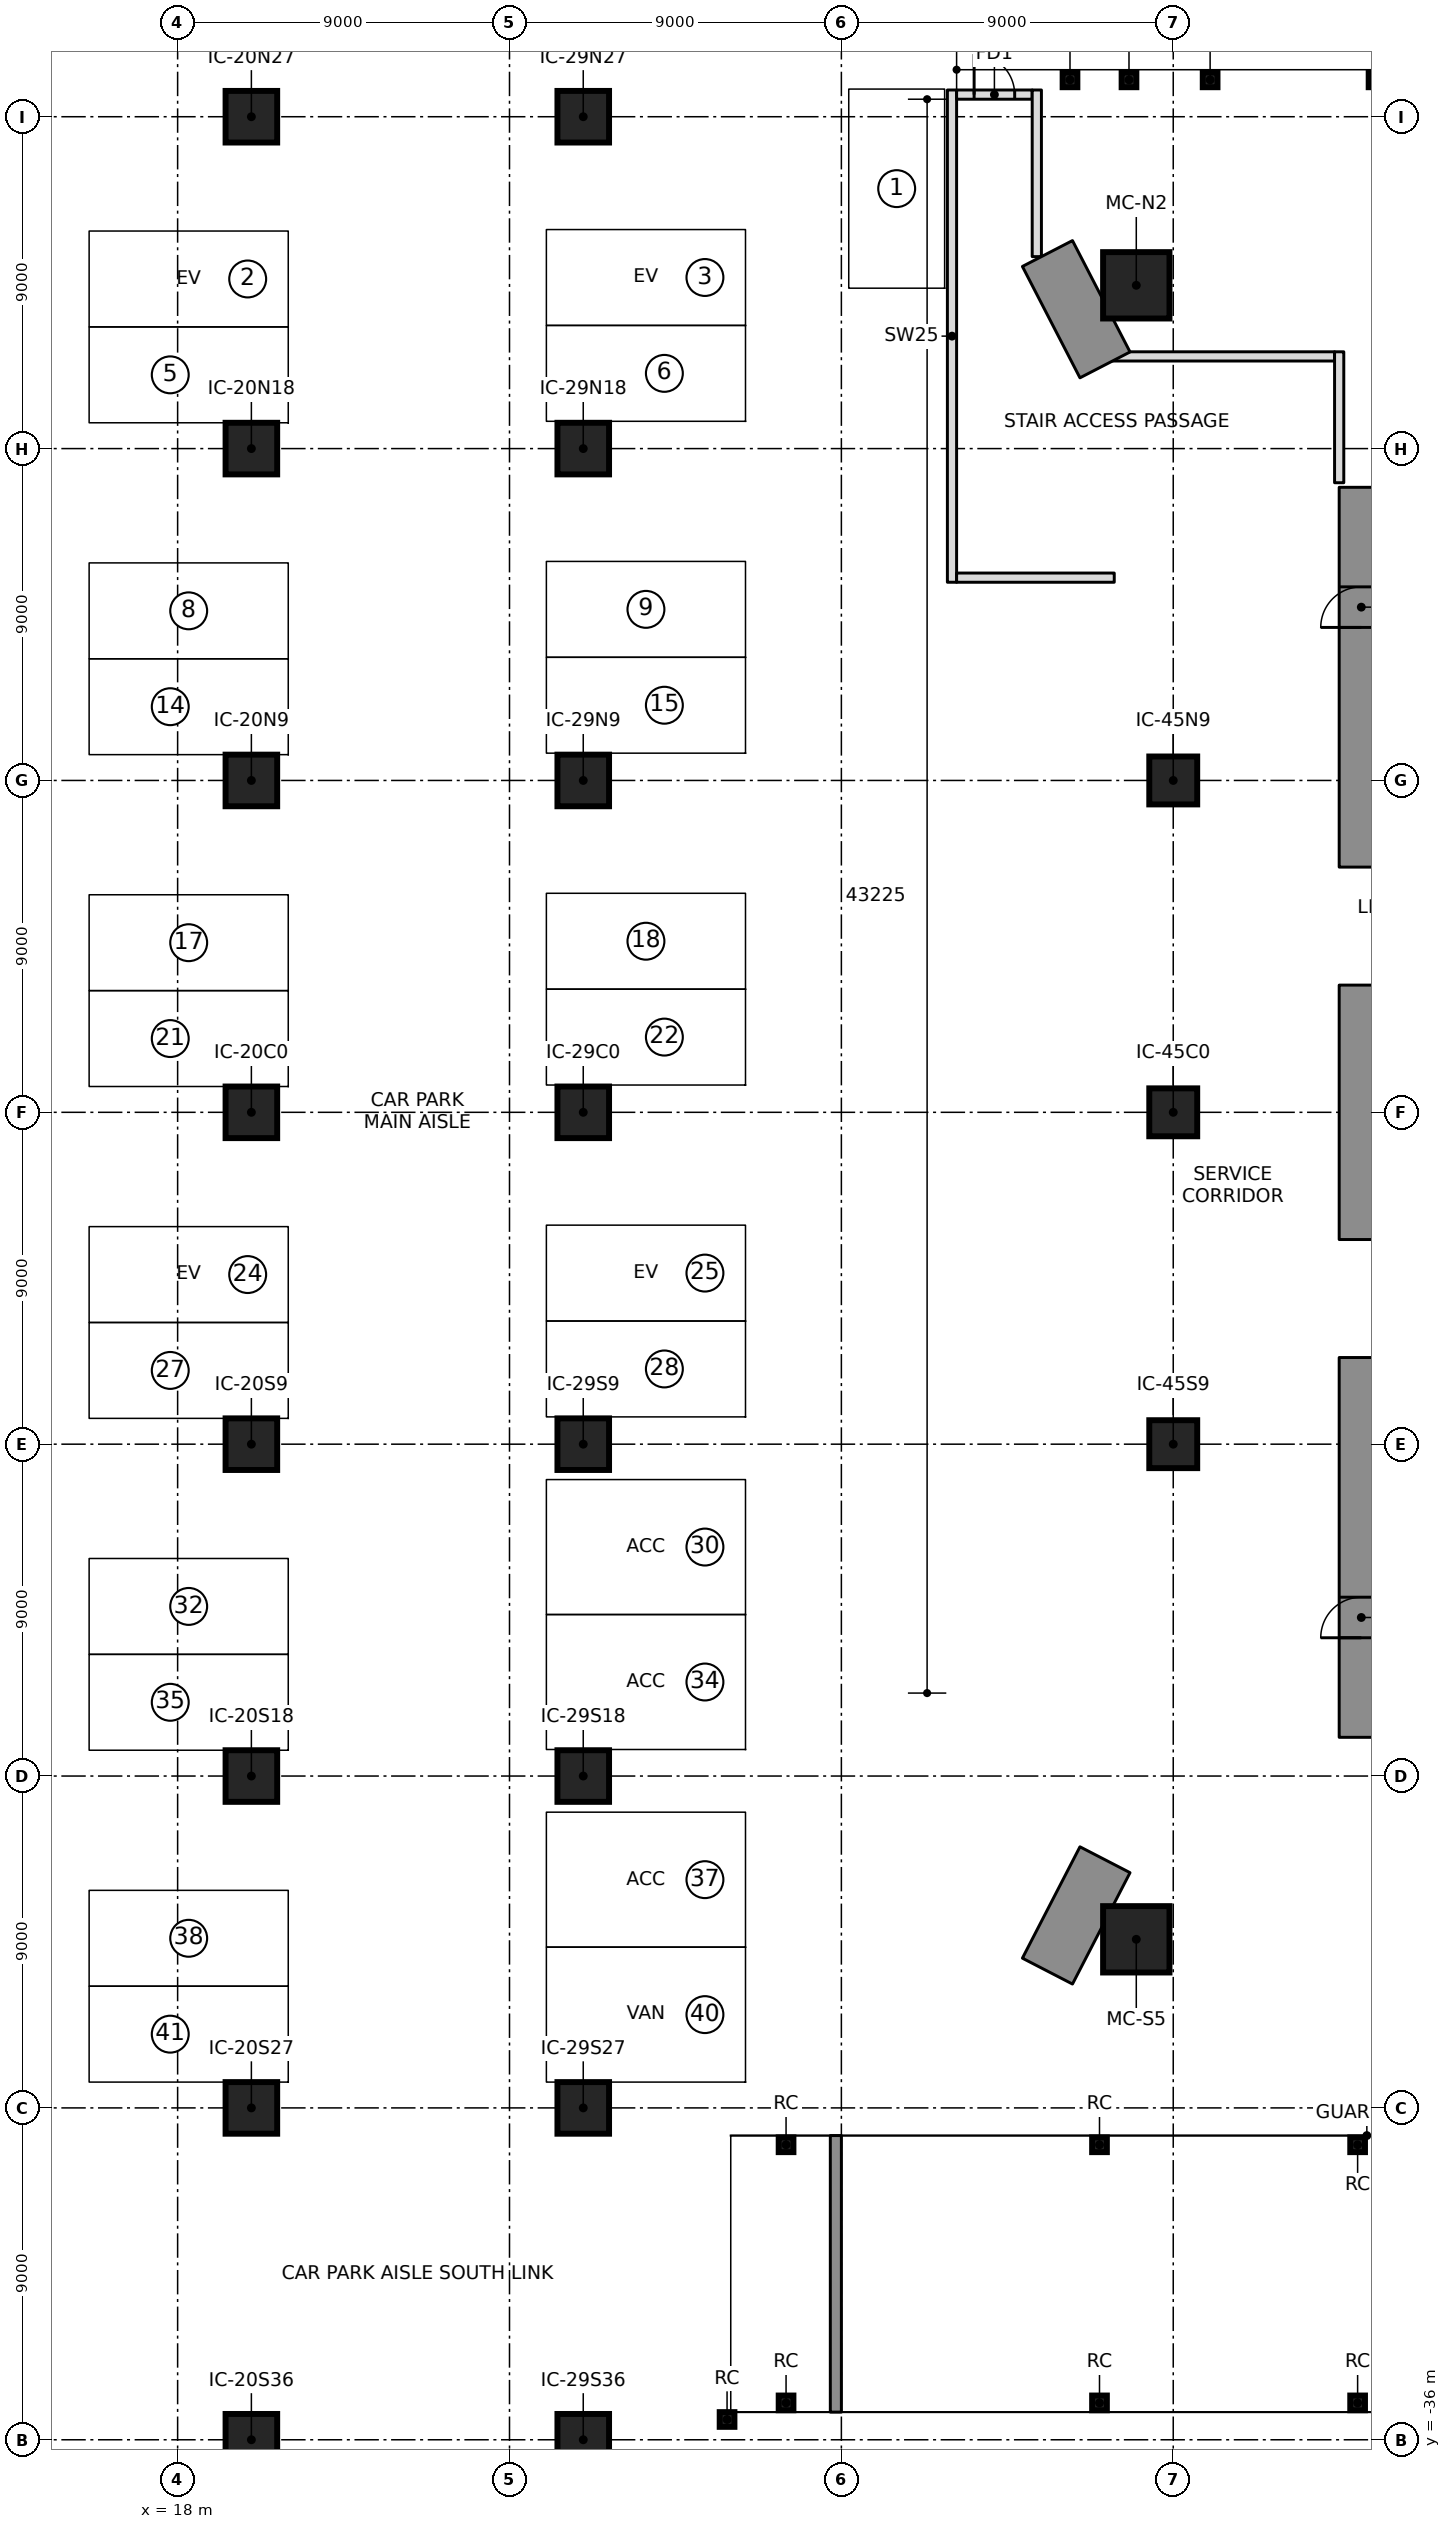
"""IFC4 building model, lengths in metres.
Left out: names, types, materials, properties, quantities, classifications, styles, units other than length and angle.
Written with IfcOpenShell. Run it as: python <this file> out.ifc"""

import sys

from ifc_helpers import new_model, si_unit, direction, frame, frame_2d, origin, origin_2d, place, context, subcontext, project, spatial, polyline, rectangle, outline, extrude, element, fill, save


model = new_model("IFC4")
c1 = context("Model", 3, precision=1e-05, world=origin(), true_north=direction((0.0, 1.0)))
c2 = subcontext(c1, "Body", "Model", "MODEL_VIEW")
j1 = project(units=[si_unit("LENGTHUNIT", "METRE"), si_unit("PLANEANGLEUNIT", "RADIAN")], contexts=[c1])
p1 = place(None, origin())
s1 = spatial("IfcSite", under=j1, at=p1, CompositionType="ELEMENT")
p2 = place(p1, origin())
s2 = spatial("IfcBuilding", under=s1, at=p2, CompositionType="ELEMENT")
p3 = place(p2, frame((0.0, 0.0, -10.0)))
s3 = spatial("IfcBuildingStorey", under=s2, at=p3, CompositionType="ELEMENT", Elevation=-10.0)
p4 = place(p3, frame((50.1, 6.65, -0.3), z_axis=(0.0, 0.0, 1.0), x_axis=(0.0, 1.0, 0.0)))
e1 = element("IfcWall", 1, at=p4, inside=s3, PredefinedType="SHEAR", context=c2, shape_type="SweptSolid", body=[
    extrude(rectangle(XDim=10.3, YDim=1.2, at=frame_2d((5.15, 0.0))), origin(), (0.0, 0.0, 1.0), 5.3),
])
p5 = place(p4, frame((6.5, 0.0, 0.3)))
e2 = element("IfcOpeningElement", 2, at=p5, cuts=e1, PredefinedType="OPENING", context=c2, shape_type="SweptSolid", body=[
    extrude(rectangle(XDim=1.1, YDim=2.1, at=frame_2d((0.55, 1.05))), frame((0.0, 0.61, 0.0), z_axis=(0.0, -1.0, 0.0), x_axis=(1.0, 0.0, 0.0)), (0.0, 0.0, 1.0), 1.22),
])
p6 = place(p3, frame((50.1, -3.45, -0.3), z_axis=(0.0, 0.0, 1.0), x_axis=(0.0, 1.0, 0.0)))
e3 = element("IfcWall", 3, at=p6, inside=s3, PredefinedType="SHEAR", context=c2, shape_type="SweptSolid", body=[
    extrude(rectangle(XDim=6.9, YDim=1.2, at=frame_2d((3.45, 0.0))), origin(), (0.0, 0.0, 1.0), 5.3),
])
p7 = place(p3, frame((50.1, -16.95, -0.3), z_axis=(0.0, 0.0, 1.0), x_axis=(0.0, 1.0, 0.0)))
e4 = element("IfcWall", 4, at=p7, inside=s3, PredefinedType="SHEAR", context=c2, shape_type="SweptSolid", body=[
    extrude(rectangle(XDim=10.3, YDim=1.2, at=frame_2d((5.15, 0.0))), origin(), (0.0, 0.0, 1.0), 5.3),
])
p8 = place(p7, frame((2.7, 0.0, 0.3)))
e5 = element("IfcOpeningElement", 5, at=p8, cuts=e4, PredefinedType="OPENING", context=c2, shape_type="SweptSolid", body=[
    extrude(rectangle(XDim=1.1, YDim=2.1, at=frame_2d((0.55, 1.05))), frame((0.0, 0.61, 0.0), z_axis=(0.0, -1.0, 0.0), x_axis=(1.0, 0.0, 0.0)), (0.0, 0.0, 1.0), 1.22),
])
for number, where, z_axis, x_axis in (
    (6, (43.998, -22.428, -0.3), (0.0, 0.0, 1.0), (1.0, 0.0, 0.0)),
    (7, (43.998, 22.428, -0.3), (0.0, 0.0, 1.0), (1.0, 0.0, 0.0)),
):
    element("IfcColumn", number, at=place(p3, frame(where, z_axis=z_axis, x_axis=x_axis)), inside=s3, PredefinedType="COLUMN", context=c2, shape_type="SweptSolid", body=[
        extrude(rectangle(XDim=1.8, YDim=1.8, at=origin_2d()), origin(), (0.0, 0.0, 1.0), 5.3),
    ])
for number, where, z_axis, x_axis in (
    (8, (20.0, -36.0, -0.3), (0.0, 0.0, 1.0), (1.0, 0.0, 0.0)),
    (9, (20.0, -27.0, -0.3), (0.0, 0.0, 1.0), (1.0, 0.0, 0.0)),
    (10, (20.0, -18.0, -0.3), (0.0, 0.0, 1.0), (1.0, 0.0, 0.0)),
    (11, (20.0, -9.0, -0.3), (0.0, 0.0, 1.0), (1.0, 0.0, 0.0)),
    (12, (20.0, 0.0, -0.3), (0.0, 0.0, 1.0), (1.0, 0.0, 0.0)),
    (13, (20.0, 9.0, -0.3), (0.0, 0.0, 1.0), (1.0, 0.0, 0.0)),
    (14, (20.0, 18.0, -0.3), (0.0, 0.0, 1.0), (1.0, 0.0, 0.0)),
    (15, (20.0, 27.0, -0.3), (0.0, 0.0, 1.0), (1.0, 0.0, 0.0)),
    (16, (29.0, -36.0, -0.3), (0.0, 0.0, 1.0), (1.0, 0.0, 0.0)),
    (17, (29.0, -27.0, -0.3), (0.0, 0.0, 1.0), (1.0, 0.0, 0.0)),
    (18, (29.0, -18.0, -0.3), (0.0, 0.0, 1.0), (1.0, 0.0, 0.0)),
    (19, (29.0, -9.0, -0.3), (0.0, 0.0, 1.0), (1.0, 0.0, 0.0)),
    (20, (29.0, 0.0, -0.3), (0.0, 0.0, 1.0), (1.0, 0.0, 0.0)),
    (21, (29.0, 9.0, -0.3), (0.0, 0.0, 1.0), (1.0, 0.0, 0.0)),
    (22, (29.0, 18.0, -0.3), (0.0, 0.0, 1.0), (1.0, 0.0, 0.0)),
    (23, (29.0, 27.0, -0.3), (0.0, 0.0, 1.0), (1.0, 0.0, 0.0)),
):
    element("IfcColumn", number, at=place(p3, frame(where, z_axis=z_axis, x_axis=x_axis)), inside=s3, PredefinedType="COLUMN", context=c2, shape_type="SweptSolid", body=[
        extrude(rectangle(XDim=1.4, YDim=1.4, at=origin_2d()), origin(), (0.0, 0.0, 1.0), 5.3),
    ])
for number, where, z_axis, x_axis in (
    (24, (45.0, -9.0, -0.3), (0.0, 0.0, 1.0), (1.0, 0.0, 0.0)),
    (25, (45.0, 0.0, -0.3), (0.0, 0.0, 1.0), (1.0, 0.0, 0.0)),
    (26, (45.0, 9.0, -0.3), (0.0, 0.0, 1.0), (1.0, 0.0, 0.0)),
):
    element("IfcColumn", number, at=place(p3, frame(where, z_axis=z_axis, x_axis=x_axis)), inside=s3, PredefinedType="COLUMN", context=c2, shape_type="SweptSolid", body=[
        extrude(rectangle(XDim=1.3, YDim=1.3, at=origin_2d()), origin(), (0.0, 0.0, 1.0), 5.3),
    ])
for number, where, z_axis, x_axis in (
    (27, (41.69, -21.429, -0.3), (0.0, 0.0, 1.0), (0.888, -0.459, 0.0)),
    (28, (41.69, 21.429, -0.3), (0.0, 0.0, 1.0), (0.888, 0.459, 0.0)),
):
    element("IfcWall", number, at=place(p3, frame(where, z_axis=z_axis, x_axis=x_axis)), inside=s3, PredefinedType="SHEAR", context=c2, shape_type="SweptSolid", body=[
        extrude(rectangle(XDim=1.529, YDim=3.4, at=frame_2d((0.764, 0.0))), origin(), (0.0, 0.0, 1.0), 15.3),
    ])
p9 = place(p3, frame((42.2, 28.0, -0.3), z_axis=(0.0, 0.0, 1.0), x_axis=(1.0, 0.0, 0.0)))
e29 = element("IfcColumn", 29, at=p9, inside=s3, PredefinedType="COLUMN", context=c2, shape_type="SweptSolid", body=[
    extrude(rectangle(XDim=0.4, YDim=0.4, at=origin_2d()), origin(), (0.0, 0.0, 1.0), 4.908),
])
p10 = place(p3, frame((43.8, 28.0, -0.3), z_axis=(0.0, 0.0, 1.0), x_axis=(1.0, 0.0, 0.0)))
e30 = element("IfcColumn", 30, at=p10, inside=s3, PredefinedType="COLUMN", context=c2, shape_type="SweptSolid", body=[
    extrude(rectangle(XDim=0.4, YDim=0.4, at=origin_2d()), origin(), (0.0, 0.0, 1.0), 5.042),
])
p11 = place(p3, frame((46.0, 28.0, -0.3), z_axis=(0.0, 0.0, 1.0), x_axis=(1.0, 0.0, 0.0)))
e31 = element("IfcColumn", 31, at=p11, inside=s3, PredefinedType="COLUMN", context=c2, shape_type="SweptSolid", body=[
    extrude(rectangle(XDim=0.4, YDim=0.4, at=origin_2d()), origin(), (0.0, 0.0, 1.0), 5.337),
])
p12 = place(p3, frame((50.5, 28.0, -0.3), z_axis=(0.0, 0.0, 1.0), x_axis=(1.0, 0.0, 0.0)))
e32 = element("IfcColumn", 32, at=p12, inside=s3, PredefinedType="COLUMN", context=c2, shape_type="SweptSolid", body=[
    extrude(rectangle(XDim=0.4, YDim=0.4, at=origin_2d()), origin(), (0.0, 0.0, 1.0), 5.3),
])
for number, where, z_axis, x_axis in (
    (33, (34.5, -35.0, -0.3), (0.0, 0.0, 1.0), (1.0, 0.0, 0.0)),
    (34, (34.5, -28.0, -0.3), (0.0, 0.0, 1.0), (1.0, 0.0, 0.0)),
):
    element("IfcColumn", number, at=place(p3, frame(where, z_axis=z_axis, x_axis=x_axis)), inside=s3, PredefinedType="COLUMN", context=c2, shape_type="SweptSolid", body=[
        extrude(rectangle(XDim=0.4, YDim=0.4, at=origin_2d()), origin(), (0.0, 0.0, 1.0), 4.725),
    ])
for number, where, z_axis, x_axis in (
    (35, (43.0, -35.0, -0.3), (0.0, 0.0, 1.0), (1.0, 0.0, 0.0)),
    (36, (43.0, -28.0, -0.3), (0.0, 0.0, 1.0), (1.0, 0.0, 0.0)),
):
    element("IfcColumn", number, at=place(p3, frame(where, z_axis=z_axis, x_axis=x_axis)), inside=s3, PredefinedType="COLUMN", context=c2, shape_type="SweptSolid", body=[
        extrude(rectangle(XDim=0.4, YDim=0.4, at=origin_2d()), origin(), (0.0, 0.0, 1.0), 3.495),
    ])
for number, where, z_axis, x_axis in (
    (37, (50.0, -35.0, -0.3), (0.0, 0.0, 1.0), (1.0, 0.0, 0.0)),
    (38, (50.0, -28.0, -0.3), (0.0, 0.0, 1.0), (1.0, 0.0, 0.0)),
):
    element("IfcColumn", number, at=place(p3, frame(where, z_axis=z_axis, x_axis=x_axis)), inside=s3, PredefinedType="COLUMN", context=c2, shape_type="SweptSolid", body=[
        extrude(rectangle(XDim=0.4, YDim=0.4, at=origin_2d()), origin(), (0.0, 0.0, 1.0), 2.39),
    ])
p13 = place(p3, frame((32.9, -35.45, -0.3), z_axis=(0.0, 0.0, 1.0), x_axis=(1.0, 0.0, 0.0)))
e39 = element("IfcColumn", 39, at=p13, inside=s3, PredefinedType="COLUMN", context=c2, shape_type="SweptSolid", body=[
    extrude(rectangle(XDim=0.4, YDim=0.4, at=origin_2d()), origin(), (0.0, 0.0, 1.0), 5.0),
])
p14 = place(p3, frame((35.85, -35.25, -0.3), z_axis=(0.0, 0.0, 1.0), x_axis=(0.0, 1.0, 0.0)))
e40 = element("IfcWall", 40, at=p14, inside=s3, PredefinedType="SOLIDWALL", context=c2, shape_type="SweptSolid", body=[
    extrude(rectangle(XDim=7.5, YDim=0.3, at=frame_2d((3.75, 0.0))), origin(), (0.0, 0.0, 1.0), 4.594),
])
p15 = place(p3, frame((39.0, 14.375, 0.0), z_axis=(0.0, 0.0, 1.0), x_axis=(0.0, 1.0, 0.0)))
e41 = element("IfcWall", 41, at=p15, inside=s3, PredefinedType="PARTITIONING", context=c2, shape_type="SweptSolid", body=[
    extrude(rectangle(XDim=13.35, YDim=0.25, at=frame_2d((6.675, 0.0))), origin(), (0.0, 0.0, 1.0), 4.7),
])
p16 = place(p3, frame((39.125, 14.5, 0.0), z_axis=(0.0, 0.0, 1.0), x_axis=(1.0, 0.0, 0.0)))
e42 = element("IfcWall", 42, at=p16, inside=s3, PredefinedType="PARTITIONING", context=c2, shape_type="SweptSolid", body=[
    extrude(rectangle(XDim=4.275, YDim=0.25, at=frame_2d((2.137, 0.0))), origin(), (0.0, 0.0, 1.0), 4.7),
])
p17 = place(p3, frame((39.125, 27.6, 0.0), z_axis=(0.0, 0.0, 1.0), x_axis=(1.0, 0.0, 0.0)))
e43 = element("IfcWall", 43, at=p17, inside=s3, PredefinedType="PARTITIONING", context=c2, shape_type="SweptSolid", body=[
    extrude(rectangle(XDim=2.05, YDim=0.25, at=frame_2d((1.025, 0.0))), origin(), (0.0, 0.0, 1.0), 4.7),
])
p18 = place(p17, frame((0.475, 0.0, 0.0)))
e44 = element("IfcOpeningElement", 44, at=p18, cuts=e43, PredefinedType="OPENING", context=c2, shape_type="SweptSolid", body=[
    extrude(rectangle(XDim=1.1, YDim=2.1, at=frame_2d((0.55, 1.05))), frame((0.0, 0.135, 0.0), z_axis=(0.0, -1.0, 0.0), x_axis=(1.0, 0.0, 0.0)), (0.0, 0.0, 1.0), 0.27),
])
p19 = place(p3, frame((41.3, 23.141, 0.0), z_axis=(0.0, 0.0, 1.0), x_axis=(0.0, 1.0, 0.0)))
e45 = element("IfcWall", 45, at=p19, inside=s3, PredefinedType="PARTITIONING", context=c2, shape_type="SweptSolid", body=[
    extrude(outline(polyline([(0.065, -0.125), (4.584, -0.125), (4.584, 0.125), (-0.065, 0.125), (0.065, -0.125)])), origin(), (0.0, 0.0, 1.0), 4.7),
])
p20 = place(p3, frame((43.595, 20.5, 0.0), z_axis=(0.0, 0.0, 1.0), x_axis=(1.0, 0.0, 0.0)))
e46 = element("IfcWall", 46, at=p20, inside=s3, PredefinedType="PARTITIONING", context=c2, shape_type="SweptSolid", body=[
    extrude(outline(polyline([(-0.242, -0.125), (5.78, -0.125), (5.78, 0.125), (0.242, 0.125), (-0.242, -0.125)])), origin(), (0.0, 0.0, 1.0), 4.7),
])
p21 = place(p3, frame((49.5, 17.074, 0.0), z_axis=(0.0, 0.0, 1.0), x_axis=(0.0, 1.0, 0.0)))
e47 = element("IfcWall", 47, at=p21, inside=s3, PredefinedType="PARTITIONING", context=c2, shape_type="SweptSolid", body=[
    extrude(rectangle(XDim=3.551, YDim=0.25, at=frame_2d((1.775, 0.0))), origin(), (0.0, 0.0, 1.0), 4.7),
])
p22 = place(p5, origin())
e48 = element("IfcDoor", 48, at=p22, inside=s3, OperationType="SINGLE_SWING_RIGHT", PredefinedType="DOOR", context=c2, shape_type="SweptSolid", body=[
    extrude(rectangle(XDim=1.1, YDim=2.1, at=frame_2d((0.55, 1.05))), frame((0.0, 0.025, 0.0), z_axis=(0.0, -1.0, 0.0), x_axis=(1.0, 0.0, 0.0)), (0.0, 0.0, 1.0), 0.05),
])
fill(e2, e48)
p23 = place(p8, origin())
e49 = element("IfcDoor", 49, at=p23, inside=s3, OperationType="SINGLE_SWING_RIGHT", PredefinedType="DOOR", context=c2, shape_type="SweptSolid", body=[
    extrude(rectangle(XDim=1.1, YDim=2.1, at=frame_2d((0.55, 1.05))), frame((0.0, 0.025, 0.0), z_axis=(0.0, -1.0, 0.0), x_axis=(1.0, 0.0, 0.0)), (0.0, 0.0, 1.0), 0.05),
])
fill(e5, e49)
p24 = place(p18, origin())
e50 = element("IfcDoor", 50, at=p24, inside=s3, OperationType="SINGLE_SWING_RIGHT", PredefinedType="DOOR", context=c2, shape_type="SweptSolid", body=[
    extrude(rectangle(XDim=1.1, YDim=2.1, at=frame_2d((0.55, 1.05))), frame((0.0, 0.025, 0.0), z_axis=(0.0, -1.0, 0.0), x_axis=(1.0, 0.0, 0.0)), (0.0, 0.0, 1.0), 0.05),
])
fill(e44, e50)
save(model, sys.argv[1])
